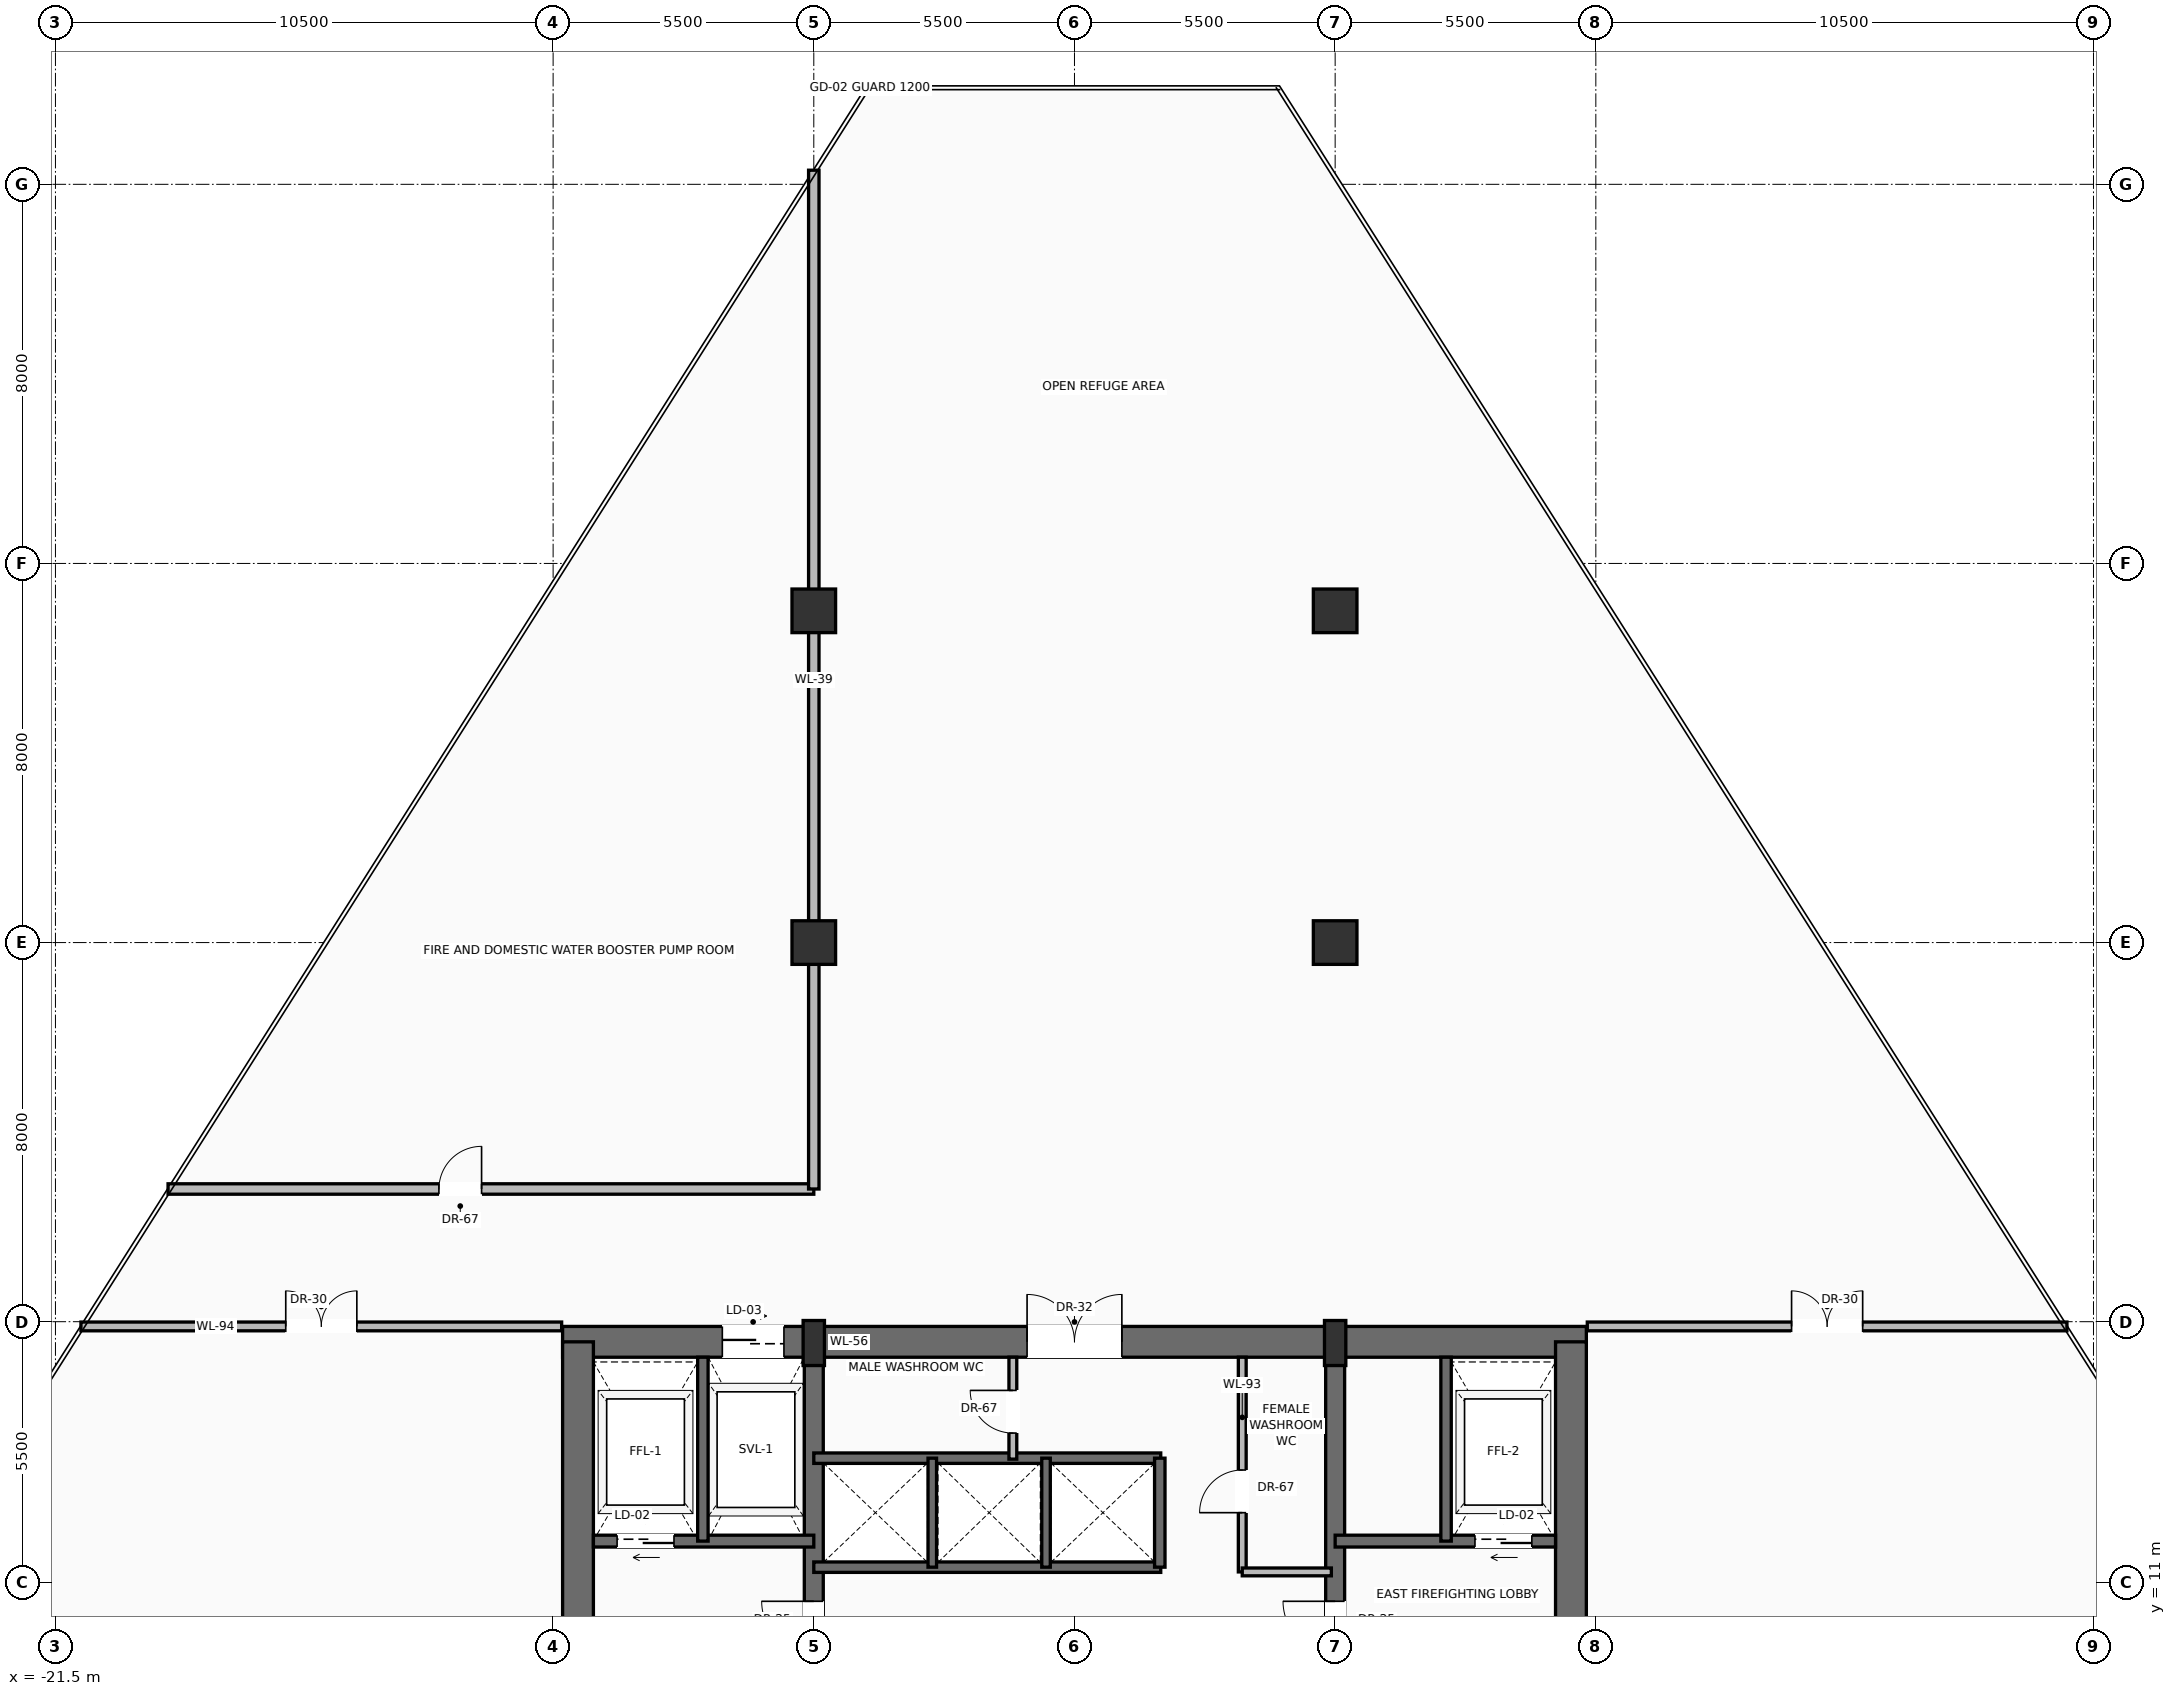
"""IFC4 building model, lengths in metres.
Left out: names, types, materials, properties, quantities, classifications, styles, units other than length and angle.
Written with IfcOpenShell. Run it as: python <this file> out.ifc"""

import sys

from ifc_helpers import new_model, si_unit, direction, frame, frame_2d, origin, origin_2d, place, context, subcontext, project, spatial, rectangle, extrude, source, transform, mapped, element, fill, save


model = new_model("IFC4")
c1 = context("Model", 3, precision=1e-05, world=origin(), true_north=direction((0.0, 1.0)))
c2 = subcontext(c1, "Body", "Model", "MODEL_VIEW")
j1 = project(units=[si_unit("LENGTHUNIT", "METRE"), si_unit("PLANEANGLEUNIT", "RADIAN")], contexts=[c1])
p1 = place(None, origin())
s1 = spatial("IfcSite", under=j1, at=p1, CompositionType="ELEMENT")
p2 = place(p1, origin())
s2 = spatial("IfcBuilding", under=s1, at=p2, CompositionType="ELEMENT")
p3 = place(p2, frame((0.0, 0.0, 166.3)))
s3 = spatial("IfcBuildingStorey", under=s2, at=p3, CompositionType="ELEMENT", Elevation=166.3)
p4 = place(p3, frame((-10.8, 16.075, 0.0), z_axis=(0.0, 0.0, 1.0), x_axis=(1.0, 0.0, 0.0)))
e1 = element("IfcWall", 1, at=p4, inside=s3, PredefinedType="SHEAR", context=c2, shape_type="SweptSolid", body=[
    extrude(rectangle(XDim=21.6, YDim=0.65, at=frame_2d((10.8, 0.0))), origin(), (0.0, 0.0, 1.0), 4.47),
])
p5 = place(p4, frame((3.37, 0.0, 0.0)))
e2 = element("IfcOpeningElement", 2, at=p5, cuts=e1, PredefinedType="OPENING", context=c2, shape_type="SweptSolid", body=[
    extrude(rectangle(XDim=1.3, YDim=2.3, at=frame_2d((0.65, 1.15))), frame((0.0, 0.335, 0.0), z_axis=(0.0, -1.0, 0.0), x_axis=(1.0, 0.0, 0.0)), (0.0, 0.0, 1.0), 0.67),
])
p6 = place(p4, frame((9.8, 0.0, 0.0)))
e3 = element("IfcOpeningElement", 3, at=p6, cuts=e1, PredefinedType="OPENING", context=c2, shape_type="SweptSolid", body=[
    extrude(rectangle(XDim=2.0, YDim=2.4, at=frame_2d((1.0, 1.2))), frame((0.0, 0.335, 0.0), z_axis=(0.0, -1.0, 0.0), x_axis=(1.0, 0.0, 0.0)), (0.0, 0.0, 1.0), 0.67),
])
for number, where, z_axis, x_axis in (
    (4, (-10.475, 0.525, 0.0), (0.0, 0.0, 1.0), (0.0, 1.0, 0.0)),
    (5, (10.475, 0.525, 0.0), (0.0, 0.0, 1.0), (0.0, 1.0, 0.0)),
):
    element("IfcWall", number, at=place(p3, frame(where, z_axis=z_axis, x_axis=x_axis)), inside=s3, PredefinedType="SHEAR", context=c2, shape_type="SweptSolid", body=[
        extrude(rectangle(XDim=15.55, YDim=0.65, at=frame_2d((7.775, 0.0))), origin(), (0.0, 0.0, 1.0), 4.47),
    ])
p7 = place(p3, frame((-5.5, 0.525, 0.0), z_axis=(0.0, 0.0, 1.0), x_axis=(0.0, 1.0, 0.0)))
e6 = element("IfcWall", 6, at=p7, inside=s3, PredefinedType="SHEAR", context=c2, shape_type="SweptSolid", body=[
    extrude(rectangle(XDim=15.55, YDim=0.4, at=frame_2d((7.775, 0.0))), origin(), (0.0, 0.0, 1.0), 4.47),
])
p8 = place(p7, frame((8.975, 0.0, 0.0)))
e7 = element("IfcOpeningElement", 7, at=p8, cuts=e6, PredefinedType="OPENING", context=c2, shape_type="SweptSolid", body=[
    extrude(rectangle(XDim=1.1, YDim=2.2, at=frame_2d((0.55, 1.1))), frame((0.0, 0.21, 0.0), z_axis=(0.0, -1.0, 0.0), x_axis=(1.0, 0.0, 0.0)), (0.0, 0.0, 1.0), 0.42),
])
p9 = place(p3, frame((5.5, 0.525, 0.0), z_axis=(0.0, 0.0, 1.0), x_axis=(0.0, 1.0, 0.0)))
e8 = element("IfcWall", 8, at=p9, inside=s3, PredefinedType="SHEAR", context=c2, shape_type="SweptSolid", body=[
    extrude(rectangle(XDim=15.55, YDim=0.4, at=frame_2d((7.775, 0.0))), origin(), (0.0, 0.0, 1.0), 4.47),
])
p10 = place(p9, frame((8.975, 0.0, 0.0)))
e9 = element("IfcOpeningElement", 9, at=p10, cuts=e8, PredefinedType="OPENING", context=c2, shape_type="SweptSolid", body=[
    extrude(rectangle(XDim=1.1, YDim=2.2, at=frame_2d((0.55, 1.1))), frame((0.0, 0.21, 0.0), z_axis=(0.0, -1.0, 0.0), x_axis=(1.0, 0.0, 0.0)), (0.0, 0.0, 1.0), 0.42),
])
m1 = source(origin(), c2, "Body", "SweptSolid", [
    extrude(rectangle(XDim=0.45, YDim=0.95, at=origin_2d()), origin(), (0.0, 0.0, 1.0), 4.7),
])
for number, where, z_axis, x_axis in (
    (10, (-5.5, 16.05, 0.0), (0.0, 0.0, 1.0), (1.0, 0.0, 0.0)),
    (11, (5.5, 16.05, 0.0), (0.0, 0.0, 1.0), (1.0, 0.0, 0.0)),
):
    element("IfcColumn", number, at=place(p3, frame(where, z_axis=z_axis, x_axis=x_axis)), inside=s3, PredefinedType="PILASTER", context=c2, shape_type="MappedRepresentation", body=[
        mapped(m1, transform((0.0, 0.0, 0.0), scale=1.0)),
    ])
m2 = source(origin(), c2, "Body", "SweptSolid", [
    extrude(rectangle(XDim=0.92, YDim=0.92, at=origin_2d()), origin(), (0.0, 0.0, 1.0), 4.7),
])
for number, where, z_axis, x_axis in (
    (12, (-5.5, 24.5, 0.0), (0.0, 0.0, 1.0), (1.0, 0.0, 0.0)),
    (13, (5.5, 24.5, 0.0), (0.0, 0.0, 1.0), (1.0, 0.0, 0.0)),
    (14, (-5.5, 31.5, 0.0), (0.0, 0.0, 1.0), (1.0, 0.0, 0.0)),
    (15, (5.5, 31.5, 0.0), (0.0, 0.0, 1.0), (1.0, 0.0, 0.0)),
):
    element("IfcColumn", number, at=place(p3, frame(where, z_axis=z_axis, x_axis=x_axis)), inside=s3, PredefinedType="COLUMN", context=c2, shape_type="MappedRepresentation", body=[
        mapped(m2, transform((0.0, 0.0, 0.0), scale=1.0)),
    ])
p11 = place(p3, frame((-5.5, 11.87, 0.0), z_axis=(0.0, 0.0, 1.0), x_axis=(-1.0, 0.0, 0.0)))
e16 = element("IfcWall", 16, at=p11, inside=s3, PredefinedType="SOLIDWALL", context=c2, shape_type="SweptSolid", body=[
    extrude(rectangle(XDim=4.65, YDim=0.25, at=frame_2d((2.325, 0.0))), origin(), (0.0, 0.0, 1.0), 4.47),
])
p12 = place(p11, frame((2.95, 0.0, 0.0)))
e17 = element("IfcOpeningElement", 17, at=p12, cuts=e16, PredefinedType="OPENING", context=c2, shape_type="SweptSolid", body=[
    extrude(rectangle(XDim=1.2, YDim=2.25, at=frame_2d((0.6, 1.125))), frame((0.0, 0.135, 0.0), z_axis=(0.0, -1.0, 0.0), x_axis=(1.0, 0.0, 0.0)), (0.0, 0.0, 1.0), 0.27),
])
p13 = place(p3, frame((-7.84, 11.87, 0.0), z_axis=(0.0, 0.0, 1.0), x_axis=(0.0, 1.0, 0.0)))
e18 = element("IfcWall", 18, at=p13, inside=s3, PredefinedType="SOLIDWALL", context=c2, shape_type="SweptSolid", body=[
    extrude(rectangle(XDim=3.88, YDim=0.22, at=frame_2d((1.94, 0.0))), origin(), (0.0, 0.0, 1.0), 4.47),
])
p14 = place(p3, frame((10.15, 11.87, 0.0), z_axis=(0.0, 0.0, 1.0), x_axis=(-1.0, 0.0, 0.0)))
e19 = element("IfcWall", 19, at=p14, inside=s3, PredefinedType="SOLIDWALL", context=c2, shape_type="SweptSolid", body=[
    extrude(rectangle(XDim=4.65, YDim=0.25, at=frame_2d((2.325, 0.0))), origin(), (0.0, 0.0, 1.0), 4.47),
])
p15 = place(p14, frame((0.5, 0.0, 0.0)))
e20 = element("IfcOpeningElement", 20, at=p15, cuts=e19, PredefinedType="OPENING", context=c2, shape_type="SweptSolid", body=[
    extrude(rectangle(XDim=1.2, YDim=2.25, at=frame_2d((0.6, 1.125))), frame((0.0, 0.135, 0.0), z_axis=(0.0, -1.0, 0.0), x_axis=(1.0, 0.0, 0.0)), (0.0, 0.0, 1.0), 0.27),
])
p16 = place(p3, frame((7.84, 11.87, 0.0), z_axis=(0.0, 0.0, 1.0), x_axis=(0.0, 1.0, 0.0)))
e21 = element("IfcWall", 21, at=p16, inside=s3, PredefinedType="SOLIDWALL", context=c2, shape_type="SweptSolid", body=[
    extrude(rectangle(XDim=3.88, YDim=0.22, at=frame_2d((1.94, 0.0))), origin(), (0.0, 0.0, 1.0), 4.47),
])
for number, where, z_axis, x_axis in (
    (22, (-5.5, 11.32, 0.0), (0.0, 0.0, 1.0), (1.0, 0.0, 0.0)),
    (23, (-5.5, 13.62, 0.0), (0.0, 0.0, 1.0), (1.0, 0.0, 0.0)),
):
    element("IfcWall", number, at=place(p3, frame(where, z_axis=z_axis, x_axis=x_axis)), inside=s3, PredefinedType="SOLIDWALL", context=c2, shape_type="SweptSolid", body=[
        extrude(rectangle(XDim=7.32, YDim=0.22, at=frame_2d((3.66, 0.0))), origin(), (0.0, 0.0, 1.0), 4.47),
    ])
p17 = place(p3, frame((1.8, 11.32, 0.0), z_axis=(0.0, 0.0, 1.0), x_axis=(0.0, 1.0, 0.0)))
e24 = element("IfcWall", 24, at=p17, inside=s3, PredefinedType="SOLIDWALL", context=c2, shape_type="SweptSolid", body=[
    extrude(rectangle(XDim=2.3, YDim=0.22, at=frame_2d((1.15, 0.0))), origin(), (0.0, 0.0, 1.0), 4.47),
])
for number, where, z_axis, x_axis in (
    (25, (-3.0, 11.32, 0.0), (0.0, 0.0, 1.0), (0.0, 1.0, 0.0)),
    (26, (-0.6, 11.32, 0.0), (0.0, 0.0, 1.0), (0.0, 1.0, 0.0)),
):
    element("IfcWall", number, at=place(p3, frame(where, z_axis=z_axis, x_axis=x_axis)), inside=s3, PredefinedType="SOLIDWALL", context=c2, shape_type="SweptSolid", body=[
        extrude(rectangle(XDim=2.3, YDim=0.18, at=frame_2d((1.15, 0.0))), origin(), (0.0, 0.0, 1.0), 4.47),
    ])
p18 = place(p3, frame((-1.3, 13.6, 0.0), z_axis=(0.0, 0.0, 1.0), x_axis=(0.0, 1.0, 0.0)))
e27 = element("IfcWall", 27, at=p18, inside=s3, PredefinedType="PARTITIONING", context=c2, shape_type="SweptSolid", body=[
    extrude(rectangle(XDim=2.15, YDim=0.165, at=frame_2d((1.075, 0.0))), origin(), (0.0, 0.0, 1.0), 4.462),
])
p19 = place(p18, frame((0.55, 0.0, 0.0)))
e28 = element("IfcOpeningElement", 28, at=p19, cuts=e27, PredefinedType="OPENING", context=c2, shape_type="SweptSolid", body=[
    extrude(rectangle(XDim=0.9, YDim=2.1, at=frame_2d((0.45, 1.05))), frame((0.0, 0.093, 0.0), z_axis=(0.0, -1.0, 0.0), x_axis=(1.0, 0.0, 0.0)), (0.0, 0.0, 1.0), 0.185),
])
p20 = place(p3, frame((3.54, 11.22, 0.0), z_axis=(0.0, 0.0, 1.0), x_axis=(0.0, 1.0, 0.0)))
e29 = element("IfcWall", 29, at=p20, inside=s3, PredefinedType="PARTITIONING", context=c2, shape_type="SweptSolid", body=[
    extrude(rectangle(XDim=4.53, YDim=0.165, at=frame_2d((2.265, 0.0))), origin(), (0.0, 0.0, 1.0), 4.462),
])
p21 = place(p20, frame((1.25, 0.0, 0.0)))
e30 = element("IfcOpeningElement", 30, at=p21, cuts=e29, PredefinedType="OPENING", context=c2, shape_type="SweptSolid", body=[
    extrude(rectangle(XDim=0.9, YDim=2.1, at=frame_2d((0.45, 1.05))), frame((0.0, 0.093, 0.0), z_axis=(0.0, -1.0, 0.0), x_axis=(1.0, 0.0, 0.0)), (0.0, 0.0, 1.0), 0.185),
])
p22 = place(p3, frame((3.54, 11.22, 0.0), z_axis=(0.0, 0.0, 1.0), x_axis=(1.0, 0.0, 0.0)))
e31 = element("IfcWall", 31, at=p22, inside=s3, PredefinedType="PARTITIONING", context=c2, shape_type="SweptSolid", body=[
    extrude(rectangle(XDim=1.88, YDim=0.165, at=frame_2d((0.94, 0.0))), origin(), (0.0, 0.0, 1.0), 4.462),
])
p23 = place(p3, frame((-20.962, 16.4, 0.0), z_axis=(0.0, 0.0, 1.0), x_axis=(1.0, 0.0, 0.0)))
e32 = element("IfcWall", 32, at=p23, inside=s3, PredefinedType="PARTITIONING", context=c2, shape_type="SweptSolid", body=[
    extrude(rectangle(XDim=10.142, YDim=0.185, at=frame_2d((5.071, 0.0))), origin(), (0.0, 0.0, 1.0), 4.462),
])
p24 = place(p23, frame((4.321, 0.0, 0.0)))
e33 = element("IfcOpeningElement", 33, at=p24, cuts=e32, PredefinedType="OPENING", context=c2, shape_type="SweptSolid", body=[
    extrude(rectangle(XDim=1.5, YDim=2.25, at=frame_2d((0.75, 1.125))), frame((0.0, 0.103, 0.0), z_axis=(0.0, -1.0, 0.0), x_axis=(1.0, 0.0, 0.0)), (0.0, 0.0, 1.0), 0.205),
])
p25 = place(p3, frame((10.82, 16.4, 0.0), z_axis=(0.0, 0.0, 1.0), x_axis=(1.0, 0.0, 0.0)))
e34 = element("IfcWall", 34, at=p25, inside=s3, PredefinedType="PARTITIONING", context=c2, shape_type="SweptSolid", body=[
    extrude(rectangle(XDim=10.12, YDim=0.185, at=frame_2d((5.06, 0.0))), origin(), (0.0, 0.0, 1.0), 4.462),
])
p26 = place(p25, frame((4.31, 0.0, 0.0)))
e35 = element("IfcOpeningElement", 35, at=p26, cuts=e34, PredefinedType="OPENING", context=c2, shape_type="SweptSolid", body=[
    extrude(rectangle(XDim=1.5, YDim=2.25, at=frame_2d((0.75, 1.125))), frame((0.0, 0.103, 0.0), z_axis=(0.0, -1.0, 0.0), x_axis=(1.0, 0.0, 0.0)), (0.0, 0.0, 1.0), 0.205),
])
p27 = place(p3, frame((-19.124, 19.3, 0.0), z_axis=(0.0, 0.0, 1.0), x_axis=(1.0, 0.0, 0.0)))
e36 = element("IfcWall", 36, at=p27, inside=s3, PredefinedType="SOLIDWALL", context=c2, shape_type="SweptSolid", body=[
    extrude(rectangle(XDim=13.624, YDim=0.22, at=frame_2d((6.812, 0.0))), origin(), (0.0, 0.0, 1.0), 4.462),
])
p28 = place(p27, frame((5.715, 0.0, 0.0)))
e37 = element("IfcOpeningElement", 37, at=p28, cuts=e36, PredefinedType="OPENING", context=c2, shape_type="SweptSolid", body=[
    extrude(rectangle(XDim=0.9, YDim=2.1, at=frame_2d((0.45, 1.05))), frame((0.0, 0.12, 0.0), z_axis=(0.0, -1.0, 0.0), x_axis=(1.0, 0.0, 0.0)), (0.0, 0.0, 1.0), 0.24),
])
p29 = place(p3, frame((-5.5, 19.3, 0.0), z_axis=(0.0, 0.0, 1.0), x_axis=(0.0, 1.0, 0.0)))
e38 = element("IfcWall", 38, at=p29, inside=s3, PredefinedType="SOLIDWALL", context=c2, shape_type="SweptSolid", body=[
    extrude(rectangle(XDim=21.498, YDim=0.22, at=frame_2d((10.749, 0.0))), origin(), (0.0, 0.0, 1.0), 3.846),
])
m3 = source(origin(), c2, "Body", "SweptSolid", [
    extrude(rectangle(XDim=1.1, YDim=2.2, at=frame_2d((0.55, 1.1))), frame((0.0, 0.025, 0.0), z_axis=(0.0, -1.0, 0.0), x_axis=(1.0, 0.0, 0.0)), (0.0, 0.0, 1.0), 0.05),
])
p30 = place(p8, origin())
e39 = element("IfcDoor", 39, at=p30, inside=s3, OperationType="SINGLE_SWING_RIGHT", PredefinedType="DOOR", context=c2, shape_type="MappedRepresentation", body=[
    mapped(m3, transform((0.0, 0.0, 0.0), scale=1.0)),
])
fill(e7, e39)
m4 = source(origin(), c2, "Body", "SweptSolid", [
    extrude(rectangle(XDim=1.2, YDim=2.25, at=frame_2d((0.6, 1.125))), frame((0.0, 0.025, 0.0), z_axis=(0.0, -1.0, 0.0), x_axis=(1.0, 0.0, 0.0)), (0.0, 0.0, 1.0), 0.05),
])
p31 = place(p12, origin())
e40 = element("IfcDoor", 40, at=p31, inside=s3, OperationType="SLIDING_TO_LEFT", PredefinedType="DOOR", context=c2, shape_type="MappedRepresentation", body=[
    mapped(m4, transform((0.0, 0.0, 0.0), scale=1.0)),
])
fill(e17, e40)
m5 = source(origin(), c2, "Body", "SweptSolid", [
    extrude(rectangle(XDim=1.3, YDim=2.3, at=frame_2d((0.65, 1.15))), frame((0.0, 0.025, 0.0), z_axis=(0.0, -1.0, 0.0), x_axis=(1.0, 0.0, 0.0)), (0.0, 0.0, 1.0), 0.05),
])
p32 = place(p5, origin())
e41 = element("IfcDoor", 41, at=p32, inside=s3, OperationType="SLIDING_TO_RIGHT", PredefinedType="DOOR", context=c2, shape_type="MappedRepresentation", body=[
    mapped(m5, transform((0.0, 0.0, 0.0), scale=1.0)),
])
fill(e2, e41)
p33 = place(p10, origin())
e42 = element("IfcDoor", 42, at=p33, inside=s3, OperationType="SINGLE_SWING_RIGHT", PredefinedType="DOOR", context=c2, shape_type="MappedRepresentation", body=[
    mapped(m3, transform((0.0, 0.0, 0.0), scale=1.0)),
])
fill(e9, e42)
p34 = place(p15, origin())
e43 = element("IfcDoor", 43, at=p34, inside=s3, OperationType="SLIDING_TO_RIGHT", PredefinedType="DOOR", context=c2, shape_type="MappedRepresentation", body=[
    mapped(m4, transform((0.0, 0.0, 0.0), scale=1.0)),
])
fill(e20, e43)
m6 = source(origin(), c2, "Body", "SweptSolid", [
    extrude(rectangle(XDim=2.0, YDim=2.4, at=frame_2d((1.0, 1.2))), frame((0.0, 0.025, 0.0), z_axis=(0.0, -1.0, 0.0), x_axis=(1.0, 0.0, 0.0)), (0.0, 0.0, 1.0), 0.05),
])
p35 = place(p6, origin())
e44 = element("IfcDoor", 44, at=p35, inside=s3, OperationType="DOUBLE_DOOR_SINGLE_SWING", PredefinedType="DOOR", context=c2, shape_type="MappedRepresentation", body=[
    mapped(m6, transform((0.0, 0.0, 0.0), scale=1.0)),
])
fill(e3, e44)
m7 = source(origin(), c2, "Body", "SweptSolid", [
    extrude(rectangle(XDim=0.9, YDim=2.1, at=frame_2d((0.45, 1.05))), frame((0.0, 0.025, 0.0), z_axis=(0.0, -1.0, 0.0), x_axis=(1.0, 0.0, 0.0)), (0.0, 0.0, 1.0), 0.05),
])
p36 = place(p19, origin())
e45 = element("IfcDoor", 45, at=p36, inside=s3, OperationType="SINGLE_SWING_RIGHT", PredefinedType="DOOR", context=c2, shape_type="MappedRepresentation", body=[
    mapped(m7, transform((0.0, 0.0, 0.0), scale=1.0)),
])
fill(e28, e45)
p37 = place(p21, origin())
e46 = element("IfcDoor", 46, at=p37, inside=s3, OperationType="SINGLE_SWING_LEFT", PredefinedType="DOOR", context=c2, shape_type="MappedRepresentation", body=[
    mapped(m7, transform((0.0, 0.0, 0.0), scale=1.0)),
])
fill(e30, e46)
m8 = source(origin(), c2, "Body", "SweptSolid", [
    extrude(rectangle(XDim=1.5, YDim=2.25, at=frame_2d((0.75, 1.125))), frame((0.0, 0.025, 0.0), z_axis=(0.0, -1.0, 0.0), x_axis=(1.0, 0.0, 0.0)), (0.0, 0.0, 1.0), 0.05),
])
p38 = place(p24, origin())
e47 = element("IfcDoor", 47, at=p38, inside=s3, OperationType="DOUBLE_DOOR_SINGLE_SWING", PredefinedType="DOOR", context=c2, shape_type="MappedRepresentation", body=[
    mapped(m8, transform((0.0, 0.0, 0.0), scale=1.0)),
])
fill(e33, e47)
p39 = place(p26, origin())
e48 = element("IfcDoor", 48, at=p39, inside=s3, OperationType="DOUBLE_DOOR_SINGLE_SWING", PredefinedType="DOOR", context=c2, shape_type="MappedRepresentation", body=[
    mapped(m8, transform((0.0, 0.0, 0.0), scale=1.0)),
])
fill(e35, e48)
p40 = place(p28, origin())
e49 = element("IfcDoor", 49, at=p40, inside=s3, OperationType="SINGLE_SWING_RIGHT", PredefinedType="DOOR", context=c2, shape_type="MappedRepresentation", body=[
    mapped(m7, transform((0.0, 0.0, 0.0), scale=1.0)),
])
fill(e37, e49)
save(model, sys.argv[1])
